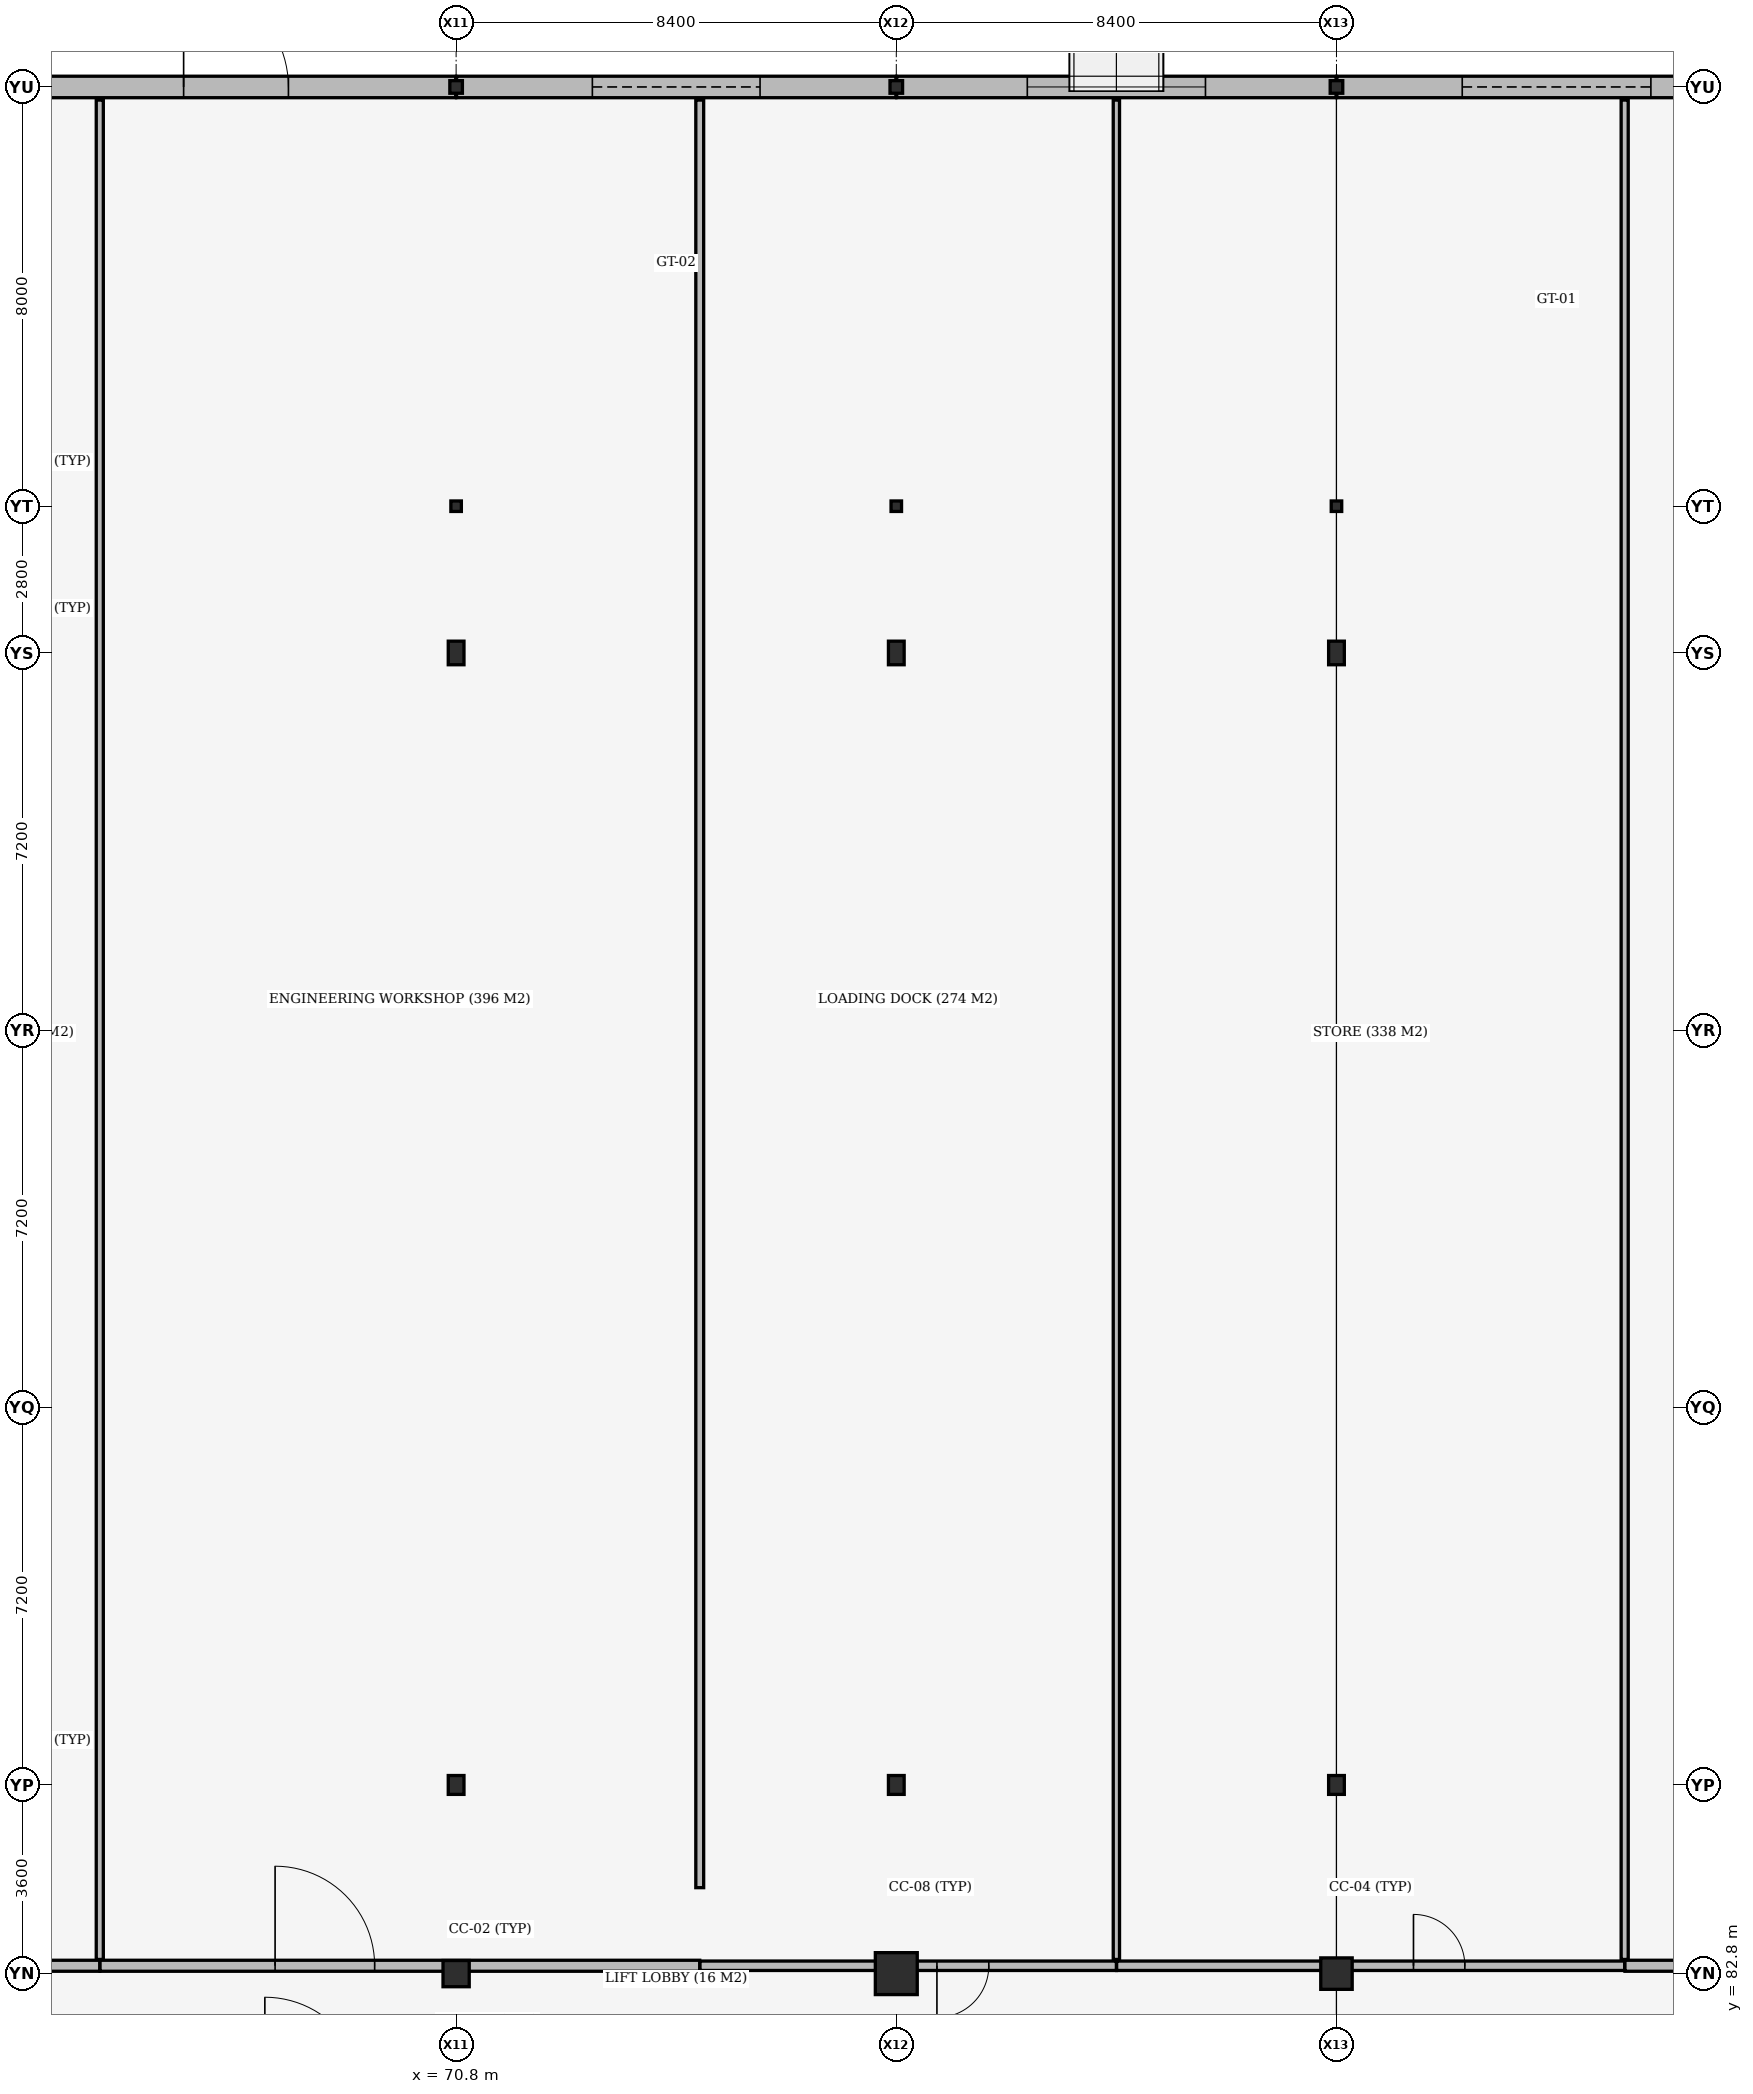
"""IFC4 building model, lengths in metres.
Left out: names, types, materials, properties, quantities, classifications, styles, units other than length and angle.
Written with IfcOpenShell. Run it as: python <this file> out.ifc"""

import sys

from ifc_helpers import new_model, si_unit, direction, frame, frame_2d, origin, origin_2d, place, context, subcontext, project, spatial, rectangle, i_section, extrude, element, fill, save


model = new_model("IFC4")
c1 = context("Model", 3, precision=1e-05, world=origin(), true_north=direction((0.0, 1.0)))
c2 = subcontext(c1, "Body", "Model", "MODEL_VIEW")
j1 = project(units=[si_unit("LENGTHUNIT", "METRE"), si_unit("PLANEANGLEUNIT", "RADIAN")], contexts=[c1])
p1 = place(None, origin())
s1 = spatial("IfcSite", under=j1, at=p1, CompositionType="ELEMENT")
p2 = place(p1, origin())
s2 = spatial("IfcBuilding", under=s1, at=p2, CompositionType="ELEMENT")
p3 = place(p2, origin())
s3 = spatial("IfcBuildingStorey", under=s2, at=p3, CompositionType="ELEMENT", Elevation=0.0)
p4 = place(p3, frame((70.8, 82.8, 0.0), z_axis=(0.0, 0.0, 1.0), x_axis=(1.0, 0.0, 0.0)))
e1 = element("IfcColumn", 1, at=p4, inside=s3, PredefinedType="COLUMN", context=c2, shape_type="SweptSolid", body=[
    extrude(rectangle(XDim=0.5, YDim=0.5, at=origin_2d()), origin(), (0.0, 0.0, 1.0), 5.08),
])
p5 = place(p3, frame((70.8, 86.4, 0.0), z_axis=(0.0, 0.0, 1.0), x_axis=(1.0, 0.0, 0.0)))
e2 = element("IfcColumn", 2, at=p5, inside=s3, PredefinedType="COLUMN", context=c2, shape_type="SweptSolid", body=[
    extrude(i_section(OverallWidth=0.3, OverallDepth=0.36, WebThickness=0.012, FlangeThickness=0.022, FilletRadius=0.027, at=origin_2d()), origin(), (0.0, 0.0, 1.0), 5.08),
])
p6 = place(p3, frame((70.8, 108.0, 0.0), z_axis=(0.0, 0.0, 1.0), x_axis=(1.0, 0.0, 0.0)))
e3 = element("IfcColumn", 3, at=p6, inside=s3, PredefinedType="COLUMN", context=c2, shape_type="SweptSolid", body=[
    extrude(i_section(OverallWidth=0.3, OverallDepth=0.45, WebThickness=0.014, FlangeThickness=0.026, FilletRadius=0.027, at=origin_2d()), origin(), (0.0, 0.0, 1.0), 5.4),
])
p7 = place(p3, frame((70.8, 110.8, 0.0), z_axis=(0.0, 0.0, 1.0), x_axis=(1.0, 0.0, 0.0)))
e4 = element("IfcColumn", 4, at=p7, inside=s3, PredefinedType="COLUMN", context=c2, shape_type="SweptSolid", body=[
    extrude(i_section(OverallWidth=0.2, OverallDepth=0.2, WebThickness=0.009, FlangeThickness=0.015, FilletRadius=0.018, at=origin_2d()), origin(), (0.0, 0.0, 1.0), 5.16),
])
p8 = place(p3, frame((70.8, 118.8, 0.0), z_axis=(0.0, 0.0, 1.0), x_axis=(1.0, 0.0, 0.0)))
e5 = element("IfcColumn", 5, at=p8, inside=s3, PredefinedType="COLUMN", context=c2, shape_type="SweptSolid", body=[
    extrude(i_section(OverallWidth=0.24, OverallDepth=0.24, WebThickness=0.01, FlangeThickness=0.017, FilletRadius=0.021, at=origin_2d()), origin(), (0.0, 0.0, 1.0), 5.16),
])
p9 = place(p3, frame((79.2, 82.8, 0.0), z_axis=(0.0, 0.0, 1.0), x_axis=(1.0, 0.0, 0.0)))
e6 = element("IfcColumn", 6, at=p9, inside=s3, PredefinedType="COLUMN", context=c2, shape_type="SweptSolid", body=[
    extrude(rectangle(XDim=0.8, YDim=0.8, at=origin_2d()), origin(), (0.0, 0.0, 1.0), 5.08),
])
p10 = place(p3, frame((79.2, 86.4, 0.0), z_axis=(0.0, 0.0, 1.0), x_axis=(1.0, 0.0, 0.0)))
e7 = element("IfcColumn", 7, at=p10, inside=s3, PredefinedType="COLUMN", context=c2, shape_type="SweptSolid", body=[
    extrude(i_section(OverallWidth=0.3, OverallDepth=0.36, WebThickness=0.012, FlangeThickness=0.022, FilletRadius=0.027, at=origin_2d()), origin(), (0.0, 0.0, 1.0), 5.08),
])
p11 = place(p3, frame((79.2, 108.0, 0.0), z_axis=(0.0, 0.0, 1.0), x_axis=(1.0, 0.0, 0.0)))
e8 = element("IfcColumn", 8, at=p11, inside=s3, PredefinedType="COLUMN", context=c2, shape_type="SweptSolid", body=[
    extrude(i_section(OverallWidth=0.3, OverallDepth=0.45, WebThickness=0.014, FlangeThickness=0.026, FilletRadius=0.027, at=origin_2d()), origin(), (0.0, 0.0, 1.0), 5.4),
])
p12 = place(p3, frame((79.2, 110.8, 0.0), z_axis=(0.0, 0.0, 1.0), x_axis=(1.0, 0.0, 0.0)))
e9 = element("IfcColumn", 9, at=p12, inside=s3, PredefinedType="COLUMN", context=c2, shape_type="SweptSolid", body=[
    extrude(i_section(OverallWidth=0.2, OverallDepth=0.2, WebThickness=0.009, FlangeThickness=0.015, FilletRadius=0.018, at=origin_2d()), origin(), (0.0, 0.0, 1.0), 5.16),
])
p13 = place(p3, frame((79.2, 118.8, 0.0), z_axis=(0.0, 0.0, 1.0), x_axis=(1.0, 0.0, 0.0)))
e10 = element("IfcColumn", 10, at=p13, inside=s3, PredefinedType="COLUMN", context=c2, shape_type="SweptSolid", body=[
    extrude(i_section(OverallWidth=0.24, OverallDepth=0.24, WebThickness=0.01, FlangeThickness=0.017, FilletRadius=0.021, at=origin_2d()), origin(), (0.0, 0.0, 1.0), 5.16),
])
p14 = place(p3, frame((87.6, 82.8, 0.0), z_axis=(0.0, 0.0, 1.0), x_axis=(1.0, 0.0, 0.0)))
e11 = element("IfcColumn", 11, at=p14, inside=s3, PredefinedType="COLUMN", context=c2, shape_type="SweptSolid", body=[
    extrude(rectangle(XDim=0.6, YDim=0.6, at=origin_2d()), origin(), (0.0, 0.0, 1.0), 5.08),
])
p15 = place(p3, frame((87.6, 86.4, 0.0), z_axis=(0.0, 0.0, 1.0), x_axis=(1.0, 0.0, 0.0)))
e12 = element("IfcColumn", 12, at=p15, inside=s3, PredefinedType="COLUMN", context=c2, shape_type="SweptSolid", body=[
    extrude(i_section(OverallWidth=0.3, OverallDepth=0.36, WebThickness=0.012, FlangeThickness=0.022, FilletRadius=0.027, at=origin_2d()), origin(), (0.0, 0.0, 1.0), 5.08),
])
p16 = place(p3, frame((87.6, 108.0, 0.0), z_axis=(0.0, 0.0, 1.0), x_axis=(1.0, 0.0, 0.0)))
e13 = element("IfcColumn", 13, at=p16, inside=s3, PredefinedType="COLUMN", context=c2, shape_type="SweptSolid", body=[
    extrude(i_section(OverallWidth=0.3, OverallDepth=0.45, WebThickness=0.014, FlangeThickness=0.026, FilletRadius=0.027, at=origin_2d()), origin(), (0.0, 0.0, 1.0), 5.4),
])
p17 = place(p3, frame((87.6, 110.8, 0.0), z_axis=(0.0, 0.0, 1.0), x_axis=(1.0, 0.0, 0.0)))
e14 = element("IfcColumn", 14, at=p17, inside=s3, PredefinedType="COLUMN", context=c2, shape_type="SweptSolid", body=[
    extrude(i_section(OverallWidth=0.2, OverallDepth=0.2, WebThickness=0.009, FlangeThickness=0.015, FilletRadius=0.018, at=origin_2d()), origin(), (0.0, 0.0, 1.0), 5.16),
])
p18 = place(p3, frame((87.6, 118.8, 0.0), z_axis=(0.0, 0.0, 1.0), x_axis=(1.0, 0.0, 0.0)))
e15 = element("IfcColumn", 15, at=p18, inside=s3, PredefinedType="COLUMN", context=c2, shape_type="SweptSolid", body=[
    extrude(i_section(OverallWidth=0.24, OverallDepth=0.24, WebThickness=0.01, FlangeThickness=0.017, FilletRadius=0.021, at=origin_2d()), origin(), (0.0, 0.0, 1.0), 5.16),
])
p19 = place(p3, frame((62.408, 118.8, 0.0), z_axis=(0.0, 0.0, 1.0), x_axis=(1.0, 0.0, 0.0)))
e16 = element("IfcWall", 16, at=p19, inside=s3, PredefinedType="STANDARD", context=c2, shape_type="SweptSolid", body=[
    extrude(rectangle(XDim=8.384, YDim=0.41, at=frame_2d((4.192, 0.0))), origin(), (0.0, 0.0, 1.0), 5.08),
])
p20 = place(p19, frame((3.192, 0.0, 0.0)))
e17 = element("IfcOpeningElement", 17, at=p20, cuts=e16, PredefinedType="OPENING", context=c2, shape_type="SweptSolid", body=[
    extrude(rectangle(XDim=2.0, YDim=2.3, at=frame_2d((1.0, 1.15))), frame((0.0, 0.215, 0.0), z_axis=(0.0, -1.0, 0.0), x_axis=(1.0, 0.0, 0.0)), (0.0, 0.0, 1.0), 0.43),
])
p21 = place(p3, frame((70.808, 118.8, 0.0), z_axis=(0.0, 0.0, 1.0), x_axis=(1.0, 0.0, 0.0)))
e18 = element("IfcWall", 18, at=p21, inside=s3, PredefinedType="STANDARD", context=c2, shape_type="SweptSolid", body=[
    extrude(rectangle(XDim=8.384, YDim=0.41, at=frame_2d((4.192, 0.0))), origin(), (0.0, 0.0, 1.0), 5.08),
])
p22 = place(p21, frame((2.592, 0.0, 0.0)))
e19 = element("IfcOpeningElement", 19, at=p22, cuts=e18, PredefinedType="OPENING", context=c2, shape_type="SweptSolid", body=[
    extrude(rectangle(XDim=3.2, YDim=3.4, at=frame_2d((1.6, 1.7))), frame((0.0, 0.215, 0.0), z_axis=(0.0, -1.0, 0.0), x_axis=(1.0, 0.0, 0.0)), (0.0, 0.0, 1.0), 0.43),
])
p23 = place(p3, frame((79.208, 118.8, 0.0), z_axis=(0.0, 0.0, 1.0), x_axis=(1.0, 0.0, 0.0)))
e20 = element("IfcWall", 20, at=p23, inside=s3, PredefinedType="STANDARD", context=c2, shape_type="SweptSolid", body=[
    extrude(rectangle(XDim=8.384, YDim=0.41, at=frame_2d((4.192, 0.0))), origin(), (0.0, 0.0, 1.0), 5.08),
])
p24 = place(p23, frame((2.492, 0.0, 1.6)))
e21 = element("IfcOpeningElement", 21, at=p24, cuts=e20, PredefinedType="OPENING", context=c2, shape_type="SweptSolid", body=[
    extrude(rectangle(XDim=3.4, YDim=1.5, at=frame_2d((1.7, 0.75))), frame((0.0, 0.215, 0.0), z_axis=(0.0, -1.0, 0.0), x_axis=(1.0, 0.0, 0.0)), (0.0, 0.0, 1.0), 0.43),
])
p25 = place(p3, frame((87.608, 118.8, 0.0), z_axis=(0.0, 0.0, 1.0), x_axis=(1.0, 0.0, 0.0)))
e22 = element("IfcWall", 22, at=p25, inside=s3, PredefinedType="STANDARD", context=c2, shape_type="SweptSolid", body=[
    extrude(rectangle(XDim=8.384, YDim=0.41, at=frame_2d((4.192, 0.0))), origin(), (0.0, 0.0, 1.0), 5.08),
])
p26 = place(p25, frame((2.392, 0.0, 0.0)))
e23 = element("IfcOpeningElement", 23, at=p26, cuts=e22, PredefinedType="OPENING", context=c2, shape_type="SweptSolid", body=[
    extrude(rectangle(XDim=3.6, YDim=3.8, at=frame_2d((1.8, 1.9))), frame((0.0, 0.215, 0.0), z_axis=(0.0, -1.0, 0.0), x_axis=(1.0, 0.0, 0.0)), (0.0, 0.0, 1.0), 0.43),
])
p27 = place(p3, frame((54.3, 82.95, 0.0), z_axis=(0.0, 0.0, 1.0), x_axis=(1.0, 0.0, 0.0)))
e24 = element("IfcWall", 24, at=p27, inside=s3, PredefinedType="STANDARD", context=c2, shape_type="SweptSolid", body=[
    extrude(rectangle(XDim=9.7, YDim=0.21, at=frame_2d((4.85, 0.0))), origin(), (0.0, 0.0, 1.0), 4.33),
])
p28 = place(p27, frame((3.9, 0.0, 0.0)))
e25 = element("IfcOpeningElement", 25, at=p28, cuts=e24, PredefinedType="OPENING", context=c2, shape_type="SweptSolid", body=[
    extrude(rectangle(XDim=1.9, YDim=2.35, at=frame_2d((0.95, 1.175))), frame((0.0, 0.115, 0.0), z_axis=(0.0, -1.0, 0.0), x_axis=(1.0, 0.0, 0.0)), (0.0, 0.0, 1.0), 0.23),
])
p29 = place(p3, frame((64.0, 83.07, 0.0), z_axis=(0.0, 0.0, 1.0), x_axis=(0.0, 1.0, 0.0)))
e26 = element("IfcWall", 26, at=p29, inside=s3, PredefinedType="PARTITIONING", context=c2, shape_type="SweptSolid", body=[
    extrude(rectangle(XDim=35.48, YDim=0.135, at=frame_2d((17.74, 0.0))), origin(), (0.0, 0.0, 1.0), 4.38),
])
p30 = place(p3, frame((64.005, 82.95, 0.0), z_axis=(0.0, 0.0, 1.0), x_axis=(1.0, 0.0, 0.0)))
e27 = element("IfcWall", 27, at=p30, inside=s3, PredefinedType="STANDARD", context=c2, shape_type="SweptSolid", body=[
    extrude(rectangle(XDim=11.444, YDim=0.21, at=frame_2d((5.722, 0.0))), origin(), (0.0, 0.0, 1.0), 4.28),
])
p31 = place(p30, frame((3.34, 0.0, 0.0)))
e28 = element("IfcOpeningElement", 28, at=p31, cuts=e27, PredefinedType="OPENING", context=c2, shape_type="SweptSolid", body=[
    extrude(rectangle(XDim=1.9, YDim=2.35, at=frame_2d((0.95, 1.175))), frame((0.0, 0.115, 0.0), z_axis=(0.0, -1.0, 0.0), x_axis=(1.0, 0.0, 0.0)), (0.0, 0.0, 1.0), 0.23),
])
p32 = place(p3, frame((75.449, 84.44, 0.0), z_axis=(0.0, 0.0, 1.0), x_axis=(0.0, 1.0, 0.0)))
e29 = element("IfcWall", 29, at=p32, inside=s3, PredefinedType="PARTITIONING", context=c2, shape_type="SweptSolid", body=[
    extrude(rectangle(XDim=34.11, YDim=0.15, at=frame_2d((17.055, 0.0))), origin(), (0.0, 0.0, 1.0), 4.33),
])
p33 = place(p3, frame((75.454, 82.95, 0.0), z_axis=(0.0, 0.0, 1.0), x_axis=(1.0, 0.0, 0.0)))
e30 = element("IfcWall", 30, at=p33, inside=s3, PredefinedType="PARTITIONING", context=c2, shape_type="SweptSolid", body=[
    extrude(rectangle(XDim=7.946, YDim=0.18, at=frame_2d((3.973, 0.0))), origin(), (0.0, 0.0, 1.0), 4.28),
])
p34 = place(p33, frame((4.521, 0.0, 0.0)))
e31 = element("IfcOpeningElement", 31, at=p34, cuts=e30, PredefinedType="OPENING", context=c2, shape_type="SweptSolid", body=[
    extrude(rectangle(XDim=0.99, YDim=2.18, at=frame_2d((0.495, 1.09))), frame((0.0, 0.1, 0.0), z_axis=(0.0, -1.0, 0.0), x_axis=(1.0, 0.0, 0.0)), (0.0, 0.0, 1.0), 0.2),
])
p35 = place(p3, frame((83.4, 83.07, 0.0), z_axis=(0.0, 0.0, 1.0), x_axis=(0.0, 1.0, 0.0)))
e32 = element("IfcWall", 32, at=p35, inside=s3, PredefinedType="PARTITIONING", context=c2, shape_type="SweptSolid", body=[
    extrude(rectangle(XDim=35.48, YDim=0.12, at=frame_2d((17.74, 0.0))), origin(), (0.0, 0.0, 1.0), 4.28),
])
p36 = place(p3, frame((83.405, 82.95, 0.0), z_axis=(0.0, 0.0, 1.0), x_axis=(1.0, 0.0, 0.0)))
e33 = element("IfcWall", 33, at=p36, inside=s3, PredefinedType="PARTITIONING", context=c2, shape_type="SweptSolid", body=[
    extrude(rectangle(XDim=9.695, YDim=0.18, at=frame_2d((4.848, 0.0))), origin(), (0.0, 0.0, 1.0), 4.28),
])
p37 = place(p36, frame((5.665, 0.0, 0.0)))
e34 = element("IfcOpeningElement", 34, at=p37, cuts=e33, PredefinedType="OPENING", context=c2, shape_type="SweptSolid", body=[
    extrude(rectangle(XDim=0.98, YDim=2.18, at=frame_2d((0.49, 1.09))), frame((0.0, 0.1, 0.0), z_axis=(0.0, -1.0, 0.0), x_axis=(1.0, 0.0, 0.0)), (0.0, 0.0, 1.0), 0.2),
])
p38 = place(p3, frame((93.1, 83.07, 0.0), z_axis=(0.0, 0.0, 1.0), x_axis=(0.0, 1.0, 0.0)))
e35 = element("IfcWall", 35, at=p38, inside=s3, PredefinedType="PARTITIONING", context=c2, shape_type="SweptSolid", body=[
    extrude(rectangle(XDim=35.48, YDim=0.135, at=frame_2d((17.74, 0.0))), origin(), (0.0, 0.0, 1.0), 4.33),
])
p39 = place(p3, frame((93.105, 82.95, 0.0), z_axis=(0.0, 0.0, 1.0), x_axis=(1.0, 0.0, 0.0)))
e36 = element("IfcWall", 36, at=p39, inside=s3, PredefinedType="STANDARD", context=c2, shape_type="SweptSolid", body=[
    extrude(rectangle(XDim=11.444, YDim=0.21, at=frame_2d((5.722, 0.0))), origin(), (0.0, 0.0, 1.0), 4.33),
])
p40 = place(p39, frame((4.772, 0.0, 0.0)))
e37 = element("IfcOpeningElement", 37, at=p40, cuts=e36, PredefinedType="OPENING", context=c2, shape_type="SweptSolid", body=[
    extrude(rectangle(XDim=1.9, YDim=2.35, at=frame_2d((0.95, 1.175))), frame((0.0, 0.115, 0.0), z_axis=(0.0, -1.0, 0.0), x_axis=(1.0, 0.0, 0.0)), (0.0, 0.0, 1.0), 0.23),
])
p41 = place(p20, origin())
e38 = element("IfcDoor", 38, at=p41, inside=s3, OperationType="DOUBLE_DOOR_SINGLE_SWING", PredefinedType="DOOR", context=c2, shape_type="SweptSolid", body=[
    extrude(rectangle(XDim=2.0, YDim=2.3, at=frame_2d((1.0, 1.15))), frame((0.0, 0.025, 0.0), z_axis=(0.0, -1.0, 0.0), x_axis=(1.0, 0.0, 0.0)), (0.0, 0.0, 1.0), 0.05),
])
fill(e17, e38)
p42 = place(p22, origin())
e39 = element("IfcDoor", 39, at=p42, inside=s3, OperationType="ROLLINGUP", PredefinedType="GATE", context=c2, shape_type="SweptSolid", body=[
    extrude(rectangle(XDim=3.2, YDim=3.4, at=frame_2d((1.6, 1.7))), frame((0.0, 0.025, 0.0), z_axis=(0.0, -1.0, 0.0), x_axis=(1.0, 0.0, 0.0)), (0.0, 0.0, 1.0), 0.05),
])
fill(e19, e39)
p43 = place(p24, origin())
e40 = element("IfcWindow", 40, at=p43, inside=s3, PartitioningType="DOUBLE_PANEL_VERTICAL", PredefinedType="WINDOW", context=c2, shape_type="SweptSolid", body=[
    extrude(rectangle(XDim=3.4, YDim=1.5, at=frame_2d((1.7, 0.75))), frame((0.0, 0.03, 0.0), z_axis=(0.0, -1.0, 0.0), x_axis=(1.0, 0.0, 0.0)), (0.0, 0.0, 1.0), 0.06),
])
fill(e21, e40)
p44 = place(p26, origin())
e41 = element("IfcDoor", 41, at=p44, inside=s3, OperationType="ROLLINGUP", PredefinedType="GATE", context=c2, shape_type="SweptSolid", body=[
    extrude(rectangle(XDim=3.6, YDim=3.8, at=frame_2d((1.8, 1.9))), frame((0.0, 0.025, 0.0), z_axis=(0.0, -1.0, 0.0), x_axis=(1.0, 0.0, 0.0)), (0.0, 0.0, 1.0), 0.05),
])
fill(e23, e41)
p45 = place(p31, origin())
e42 = element("IfcDoor", 42, at=p45, inside=s3, OperationType="DOUBLE_DOOR_SINGLE_SWING", PredefinedType="DOOR", context=c2, shape_type="SweptSolid", body=[
    extrude(rectangle(XDim=1.9, YDim=2.35, at=frame_2d((0.95, 1.175))), frame((0.0, 0.025, 0.0), z_axis=(0.0, -1.0, 0.0), x_axis=(1.0, 0.0, 0.0)), (0.0, 0.0, 1.0), 0.05),
])
fill(e28, e42)
p46 = place(p34, origin())
e43 = element("IfcDoor", 43, at=p46, inside=s3, OperationType="SINGLE_SWING_RIGHT", PredefinedType="DOOR", context=c2, shape_type="SweptSolid", body=[
    extrude(rectangle(XDim=0.99, YDim=2.18, at=frame_2d((0.495, 1.09))), frame((0.0, 0.025, 0.0), z_axis=(0.0, -1.0, 0.0), x_axis=(1.0, 0.0, 0.0)), (0.0, 0.0, 1.0), 0.05),
])
fill(e31, e43)
p47 = place(p37, origin())
e44 = element("IfcDoor", 44, at=p47, inside=s3, OperationType="SINGLE_SWING_LEFT", PredefinedType="DOOR", context=c2, shape_type="SweptSolid", body=[
    extrude(rectangle(XDim=0.98, YDim=2.18, at=frame_2d((0.49, 1.09))), frame((0.0, 0.025, 0.0), z_axis=(0.0, -1.0, 0.0), x_axis=(1.0, 0.0, 0.0)), (0.0, 0.0, 1.0), 0.05),
])
fill(e34, e44)
save(model, sys.argv[1])
